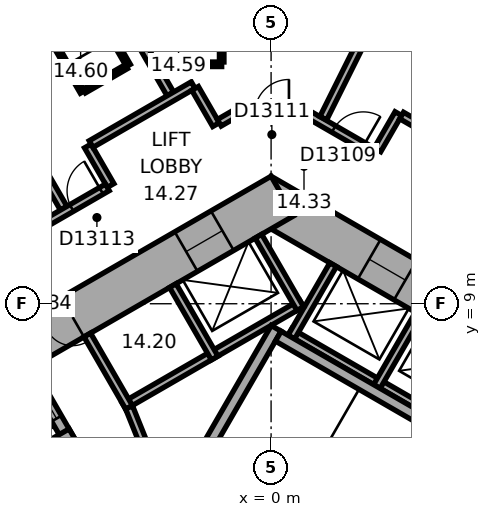
"""IFC4 building model, lengths in metres.
Left out: names, types, materials, properties, quantities, classifications, styles, units other than length and angle.
Written with IfcOpenShell. Run it as: python <this file> out.ifc"""

import sys

from ifc_helpers import new_model, si_unit, direction, frame, frame_2d, origin, place, context, subcontext, project, spatial, rectangle, extrude, element, fill, save


model = new_model("IFC4")
c1 = context("Model", 3, precision=1e-05, world=origin(), true_north=direction((0.0, 1.0)))
c2 = subcontext(c1, "Body", "Model", "MODEL_VIEW")
j1 = project(units=[si_unit("LENGTHUNIT", "METRE"), si_unit("PLANEANGLEUNIT", "RADIAN")], contexts=[c1])
p1 = place(None, origin())
s1 = spatial("IfcSite", under=j1, at=p1, CompositionType="ELEMENT")
p2 = place(p1, origin())
s2 = spatial("IfcBuilding", under=s1, at=p2, CompositionType="ELEMENT")
p3 = place(p2, frame((0.0, 0.0, 67.1)))
s3 = spatial("IfcBuildingStorey", under=s2, at=p3, CompositionType="ELEMENT", Elevation=67.1)
p4 = place(p3, frame((10.4, 5.658, 0.0), z_axis=(0.0, 0.0, 1.0), x_axis=(-0.866021384402, 0.500006961711, 0.0)))
e1 = element("IfcWall", 1, at=p4, inside=s3, PredefinedType="SHEAR", context=c2, shape_type="SweptSolid", body=[
    extrude(rectangle(XDim=12.355, YDim=1.2, at=frame_2d((6.178, 0.0))), origin(), (0.0, 0.0, 1.0), 3.3),
])
p5 = place(p4, frame((2.728, 0.0, 0.0)))
e2 = element("IfcOpeningElement", 2, at=p5, cuts=e1, PredefinedType="OPENING", context=c2, shape_type="SweptSolid", body=[
    extrude(rectangle(XDim=1.1, YDim=2.1, at=frame_2d((0.55, 1.05))), frame((0.0, 0.61, 0.0), z_axis=(0.0, -1.0, 0.0), x_axis=(1.0, 0.0, 0.0)), (0.0, 0.0, 1.0), 1.22),
])
p6 = place(p4, frame((5.328, 0.0, 0.0)))
e3 = element("IfcOpeningElement", 3, at=p6, cuts=e1, PredefinedType="OPENING", context=c2, shape_type="SweptSolid", body=[
    extrude(rectangle(XDim=1.1, YDim=2.1, at=frame_2d((0.55, 1.05))), frame((0.0, 0.61, 0.0), z_axis=(0.0, -1.0, 0.0), x_axis=(1.0, 0.0, 0.0)), (0.0, 0.0, 1.0), 1.22),
])
p7 = place(p4, frame((7.928, 0.0, 0.0)))
e4 = element("IfcOpeningElement", 4, at=p7, cuts=e1, PredefinedType="OPENING", context=c2, shape_type="SweptSolid", body=[
    extrude(rectangle(XDim=1.1, YDim=2.1, at=frame_2d((0.55, 1.05))), frame((0.0, 0.61, 0.0), z_axis=(0.0, -1.0, 0.0), x_axis=(1.0, 0.0, 0.0)), (0.0, 0.0, 1.0), 1.22),
])
p8 = place(p3, frame((0.3, 11.836, 0.0), z_axis=(0.0, 0.0, 1.0), x_axis=(-0.866021384402, -0.500006961711, 0.0)))
e5 = element("IfcWall", 5, at=p8, inside=s3, PredefinedType="SHEAR", context=c2, shape_type="SweptSolid", body=[
    extrude(rectangle(XDim=12.355, YDim=1.2, at=frame_2d((6.178, 0.0))), origin(), (0.0, 0.0, 1.0), 3.3),
])
p9 = place(p8, frame((6.378, 0.0, 0.0)))
e6 = element("IfcOpeningElement", 6, at=p9, cuts=e5, PredefinedType="OPENING", context=c2, shape_type="SweptSolid", body=[
    extrude(rectangle(XDim=1.5, YDim=2.1, at=frame_2d((0.75, 1.05))), frame((0.0, 0.61, 0.0), z_axis=(0.0, -1.0, 0.0), x_axis=(1.0, 0.0, 0.0)), (0.0, 0.0, 1.0), 1.22),
])
p10 = place(p8, frame((1.828, 0.0, 0.0)))
e7 = element("IfcOpeningElement", 7, at=p10, cuts=e5, PredefinedType="OPENING", context=c2, shape_type="SweptSolid", body=[
    extrude(rectangle(XDim=1.1, YDim=2.1, at=frame_2d((0.55, 1.05))), frame((0.0, 0.61, 0.0), z_axis=(0.0, -1.0, 0.0), x_axis=(1.0, 0.0, 0.0)), (0.0, 0.0, 1.0), 1.22),
])
p11 = place(p3, frame((20.63, 15.47, 0.0), z_axis=(0.0, 0.0, 1.0), x_axis=(-0.894934518609, 0.446197498203, 0.0)))
e8 = element("IfcWall", 8, at=p11, inside=s3, PredefinedType="STANDARD", context=c2, shape_type="SweptSolid", body=[
    extrude(rectangle(XDim=21.246, YDim=0.2, at=frame_2d((10.623, 0.0))), origin(), (0.0, 0.0, 1.0), 3.3),
])
p12 = place(p11, frame((1.553, 0.0, 0.8)))
e9 = element("IfcOpeningElement", 9, at=p12, cuts=e8, PredefinedType="OPENING", context=c2, shape_type="SweptSolid", body=[
    extrude(rectangle(XDim=2.4, YDim=1.7, at=frame_2d((1.2, 0.85))), frame((0.0, 0.11, 0.0), z_axis=(0.0, -1.0, 0.0), x_axis=(1.0, 0.0, 0.0)), (0.0, 0.0, 1.0), 0.22),
])
p13 = place(p11, frame((5.488, 0.0, 0.8)))
e10 = element("IfcOpeningElement", 10, at=p13, cuts=e8, PredefinedType="OPENING", context=c2, shape_type="SweptSolid", body=[
    extrude(rectangle(XDim=2.4, YDim=1.7, at=frame_2d((1.2, 0.85))), frame((0.0, 0.11, 0.0), z_axis=(0.0, -1.0, 0.0), x_axis=(1.0, 0.0, 0.0)), (0.0, 0.0, 1.0), 0.22),
])
p14 = place(p11, frame((9.422, 0.0, 0.8)))
e11 = element("IfcOpeningElement", 11, at=p14, cuts=e8, PredefinedType="OPENING", context=c2, shape_type="SweptSolid", body=[
    extrude(rectangle(XDim=2.4, YDim=1.7, at=frame_2d((1.2, 0.85))), frame((0.0, 0.11, 0.0), z_axis=(0.0, -1.0, 0.0), x_axis=(1.0, 0.0, 0.0)), (0.0, 0.0, 1.0), 0.22),
])
p15 = place(p11, frame((13.357, 0.0, 0.8)))
e12 = element("IfcOpeningElement", 12, at=p15, cuts=e8, PredefinedType="OPENING", context=c2, shape_type="SweptSolid", body=[
    extrude(rectangle(XDim=2.4, YDim=1.7, at=frame_2d((1.2, 0.85))), frame((0.0, 0.11, 0.0), z_axis=(0.0, -1.0, 0.0), x_axis=(1.0, 0.0, 0.0)), (0.0, 0.0, 1.0), 0.22),
])
p16 = place(p11, frame((17.292, 0.0, 0.8)))
e13 = element("IfcOpeningElement", 13, at=p16, cuts=e8, PredefinedType="OPENING", context=c2, shape_type="SweptSolid", body=[
    extrude(rectangle(XDim=2.4, YDim=1.7, at=frame_2d((1.2, 0.85))), frame((0.0, 0.11, 0.0), z_axis=(0.0, -1.0, 0.0), x_axis=(1.0, 0.0, 0.0)), (0.0, 0.0, 1.0), 0.22),
])
p17 = place(p3, frame((-3.136, 24.805, 0.0), z_axis=(0.0, 0.0, 1.0), x_axis=(-0.866028291626, -0.499994998079, 0.0)))
e14 = element("IfcWall", 14, at=p17, inside=s3, PredefinedType="STANDARD", context=c2, shape_type="SweptSolid", body=[
    extrude(rectangle(XDim=21.246, YDim=0.2, at=frame_2d((10.623, 0.0))), origin(), (0.0, 0.0, 1.0), 3.3),
])
p18 = place(p17, frame((1.555, 0.0, 0.8)))
e15 = element("IfcOpeningElement", 15, at=p18, cuts=e14, PredefinedType="OPENING", context=c2, shape_type="SweptSolid", body=[
    extrude(rectangle(XDim=2.4, YDim=1.7, at=frame_2d((1.2, 0.85))), frame((0.0, 0.11, 0.0), z_axis=(0.0, -1.0, 0.0), x_axis=(1.0, 0.0, 0.0)), (0.0, 0.0, 1.0), 0.22),
])
p19 = place(p17, frame((5.489, 0.0, 0.8)))
e16 = element("IfcOpeningElement", 16, at=p19, cuts=e14, PredefinedType="OPENING", context=c2, shape_type="SweptSolid", body=[
    extrude(rectangle(XDim=2.4, YDim=1.7, at=frame_2d((1.2, 0.85))), frame((0.0, 0.11, 0.0), z_axis=(0.0, -1.0, 0.0), x_axis=(1.0, 0.0, 0.0)), (0.0, 0.0, 1.0), 0.22),
])
p20 = place(p17, frame((9.424, 0.0, 0.8)))
e17 = element("IfcOpeningElement", 17, at=p20, cuts=e14, PredefinedType="OPENING", context=c2, shape_type="SweptSolid", body=[
    extrude(rectangle(XDim=2.4, YDim=1.7, at=frame_2d((1.2, 0.85))), frame((0.0, 0.11, 0.0), z_axis=(0.0, -1.0, 0.0), x_axis=(1.0, 0.0, 0.0)), (0.0, 0.0, 1.0), 0.22),
])
p21 = place(p17, frame((13.358, 0.0, 0.8)))
e18 = element("IfcOpeningElement", 18, at=p21, cuts=e14, PredefinedType="OPENING", context=c2, shape_type="SweptSolid", body=[
    extrude(rectangle(XDim=2.4, YDim=1.7, at=frame_2d((1.2, 0.85))), frame((0.0, 0.11, 0.0), z_axis=(0.0, -1.0, 0.0), x_axis=(1.0, 0.0, 0.0)), (0.0, 0.0, 1.0), 0.22),
])
p22 = place(p17, frame((17.293, 0.0, 0.8)))
e19 = element("IfcOpeningElement", 19, at=p22, cuts=e14, PredefinedType="OPENING", context=c2, shape_type="SweptSolid", body=[
    extrude(rectangle(XDim=2.4, YDim=1.7, at=frame_2d((1.2, 0.85))), frame((0.0, 0.11, 0.0), z_axis=(0.0, -1.0, 0.0), x_axis=(1.0, 0.0, 0.0)), (0.0, 0.0, 1.0), 0.22),
])
p23 = place(p3, frame((7.424, 4.259, 0.0), z_axis=(0.0, 0.0, 1.0), x_axis=(-0.866026010844, 0.49999894854, 0.0)))
e20 = element("IfcWall", 20, at=p23, inside=s3, PredefinedType="PARTITIONING", context=c2, shape_type="SweptSolid", body=[
    extrude(rectangle(XDim=8.0, YDim=0.2, at=frame_2d((4.0, 0.0))), origin(), (0.0, 0.0, 1.0), 3.05),
])
for number, where, z_axis, x_axis in (
    (21, (2.784, 6.822, 0.0), (0.0, 0.0, 1.0), (0.5, 0.866, 0.0)),
    (22, (0.532, 8.122, 0.0), (0.0, 0.0, 1.0), (0.5, 0.866, 0.0)),
):
    element("IfcWall", number, at=place(p3, frame(where, z_axis=z_axis, x_axis=x_axis)), inside=s3, PredefinedType="PARTITIONING", context=c2, shape_type="SweptSolid", body=[
        extrude(rectangle(XDim=2.2, YDim=0.2, at=frame_2d((1.1, 0.0))), origin(), (0.0, 0.0, 1.0), 3.05),
    ])
p24 = place(p3, frame((0.803, 9.009, 0.0), z_axis=(0.0, 0.0, 1.0), x_axis=(-0.866028230842, -0.499995103361, 0.0)))
e23 = element("IfcWall", 23, at=p24, inside=s3, PredefinedType="PARTITIONING", context=c2, shape_type="SweptSolid", body=[
    extrude(rectangle(XDim=5.4, YDim=0.2, at=frame_2d((2.7, 0.0))), origin(), (0.0, 0.0, 1.0), 3.05),
])
p25 = place(p3, frame((0.767, 8.872, 0.0), z_axis=(0.0, 0.0, 1.0), x_axis=(-0.499994660107, 0.866028486751, 0.0)))
e24 = element("IfcWall", 24, at=p25, inside=s3, PredefinedType="PARTITIONING", context=c2, shape_type="SweptSolid", body=[
    extrude(rectangle(XDim=2.2, YDim=0.2, at=frame_2d((1.1, 0.0))), origin(), (0.0, 0.0, 1.0), 3.05),
])
for number, where, z_axis, x_axis in (
    (25, (-1.485, 7.572, 0.0), (0.0, 0.0, 1.0), (-0.5, 0.866, 0.0)),
    (26, (-3.737, 6.272, 0.0), (0.0, 0.0, 1.0), (-0.5, 0.866, 0.0)),
):
    element("IfcWall", number, at=place(p3, frame(where, z_axis=z_axis, x_axis=x_axis)), inside=s3, PredefinedType="PARTITIONING", context=c2, shape_type="SweptSolid", body=[
        extrude(rectangle(XDim=2.2, YDim=0.2, at=frame_2d((1.1, 0.0))), origin(), (0.0, 0.0, 1.0), 3.05),
    ])
p26 = place(p3, frame((-2.216, 4.282, 0.0), z_axis=(0.0, 0.0, 1.0), x_axis=(0.499977259774, 0.866038532462, 0.0)))
e27 = element("IfcWall", 27, at=p26, inside=s3, PredefinedType="SHEAR", context=c2, shape_type="SweptSolid", body=[
    extrude(rectangle(XDim=4.7, YDim=0.3, at=frame_2d((2.35, 0.0))), origin(), (0.0, 0.0, 1.0), 3.05),
])
p27 = place(p3, frame((6.303, 4.617, 0.0), z_axis=(0.0, 0.0, 1.0), x_axis=(-0.866027801685, 0.499995846692, 0.0)))
e28 = element("IfcWall", 28, at=p27, inside=s3, PredefinedType="SHEAR", context=c2, shape_type="SweptSolid", body=[
    extrude(rectangle(XDim=7.06, YDim=0.3, at=frame_2d((3.53, 0.0))), origin(), (0.0, 0.0, 1.0), 3.05),
])
p28 = place(p3, frame((-5.295, 5.372, 0.0), z_axis=(0.0, 0.0, 1.0), x_axis=(-0.500077893725, 0.86598042715, 0.0)))
e29 = element("IfcWall", 29, at=p28, inside=s3, PredefinedType="SHEAR", context=c2, shape_type="SweptSolid", body=[
    extrude(rectangle(XDim=2.2, YDim=0.3, at=frame_2d((1.1, 0.0))), origin(), (0.0, 0.0, 1.0), 3.05),
])
p29 = place(p28, frame((0.7, 0.0, 0.0)))
e30 = element("IfcOpeningElement", 30, at=p29, cuts=e29, PredefinedType="OPENING", context=c2, shape_type="SweptSolid", body=[
    extrude(rectangle(XDim=1.1, YDim=2.1, at=frame_2d((0.55, 1.05))), frame((0.0, 0.16, 0.0), z_axis=(0.0, -1.0, 0.0), x_axis=(1.0, 0.0, 0.0)), (0.0, 0.0, 1.0), 0.32),
])
p30 = place(p3, frame((-5.24, 5.577, 0.0), z_axis=(0.0, 0.0, 1.0), x_axis=(-0.866014461049, -0.500018952895, 0.0)))
e31 = element("IfcWall", 31, at=p30, inside=s3, PredefinedType="SHEAR", context=c2, shape_type="SweptSolid", body=[
    extrude(rectangle(XDim=3.35, YDim=0.3, at=frame_2d((1.675, 0.0))), origin(), (0.0, 0.0, 1.0), 3.05),
])
p31 = place(p3, frame((-2.615, 3.487, 0.0), z_axis=(0.0, 0.0, 1.0), x_axis=(-0.373576831041, 0.92759924068, 0.0)))
e32 = element("IfcWall", 32, at=p31, inside=s3, PredefinedType="PARTITIONING", context=c2, shape_type="SweptSolid", body=[
    extrude(rectangle(XDim=3.002, YDim=0.2, at=frame_2d((1.501, 0.0))), origin(), (0.0, 0.0, 1.0), 3.05),
])
p32 = place(p31, frame((1.15, 0.0, 0.0)))
e33 = element("IfcOpeningElement", 33, at=p32, cuts=e32, PredefinedType="OPENING", context=c2, shape_type="SweptSolid", body=[
    extrude(rectangle(XDim=0.9, YDim=2.1, at=frame_2d((0.45, 1.05))), frame((0.0, 0.11, 0.0), z_axis=(0.0, -1.0, 0.0), x_axis=(1.0, 0.0, 0.0)), (0.0, 0.0, 1.0), 0.22),
])
p33 = place(p3, frame((-10.083, 19.524, 0.0), z_axis=(0.0, 0.0, 1.0), x_axis=(0.499999662836, -0.866025598446, 0.0)))
e34 = element("IfcWall", 34, at=p33, inside=s3, PredefinedType="PARTITIONING", context=c2, shape_type="SweptSolid", body=[
    extrude(rectangle(XDim=9.25, YDim=0.2, at=frame_2d((4.625, 0.0))), origin(), (0.0, 0.0, 1.0), 2.6),
])
p34 = place(p3, frame((-6.676, 21.492, 0.0), z_axis=(0.0, 0.0, 1.0), x_axis=(0.500011263043, -0.866018900966, 0.0)))
e35 = element("IfcWall", 35, at=p34, inside=s3, PredefinedType="PARTITIONING", context=c2, shape_type="SweptSolid", body=[
    extrude(rectangle(XDim=8.049, YDim=0.2, at=frame_2d((4.024, 0.0))), origin(), (0.0, 0.0, 1.0), 3.05),
])
p35 = place(p3, frame((-5.026, 17.469, 0.0), z_axis=(0.0, 0.0, 1.0), x_axis=(0.500005339912, -0.866022320763, 0.0)))
e36 = element("IfcWall", 36, at=p35, inside=s3, PredefinedType="PARTITIONING", context=c2, shape_type="SweptSolid", body=[
    extrude(rectangle(XDim=2.54, YDim=0.12, at=frame_2d((1.27, 0.0))), origin(), (0.0, 0.0, 1.0), 3.05),
])
p36 = place(p3, frame((-4.968, 14.569, 0.0), z_axis=(0.0, 0.0, 1.0), x_axis=(-0.500046963369, 0.865998287773, 0.0)))
e37 = element("IfcWall", 37, at=p36, inside=s3, PredefinedType="PARTITIONING", context=c2, shape_type="SweptSolid", body=[
    extrude(rectangle(XDim=2.54, YDim=0.12, at=frame_2d((1.27, 0.0))), origin(), (0.0, 0.0, 1.0), 3.05),
])
p37 = place(p36, frame((0.82, 0.0, 0.0)))
e38 = element("IfcOpeningElement", 38, at=p37, cuts=e37, PredefinedType="OPENING", context=c2, shape_type="SweptSolid", body=[
    extrude(rectangle(XDim=0.9, YDim=2.1, at=frame_2d((0.45, 1.05))), frame((0.0, 0.07, 0.0), z_axis=(0.0, -1.0, 0.0), x_axis=(1.0, 0.0, 0.0)), (0.0, 0.0, 1.0), 0.14),
])
p38 = place(p3, frame((-4.823, 13.152, 0.0), z_axis=(0.0, 0.0, 1.0), x_axis=(0.499986357472, -0.866033280158, 0.0)))
e39 = element("IfcWall", 39, at=p38, inside=s3, PredefinedType="PARTITIONING", context=c2, shape_type="SweptSolid", body=[
    extrude(rectangle(XDim=1.201, YDim=0.2, at=frame_2d((0.601, 0.0))), origin(), (0.0, 0.0, 1.0), 3.05),
])
p39 = place(p3, frame((-4.309, 12.061, 0.0), z_axis=(0.0, 0.0, 1.0), x_axis=(-0.866020679205, -0.500008183122, 0.0)))
e40 = element("IfcWall", 40, at=p39, inside=s3, PredefinedType="PARTITIONING", context=c2, shape_type="SweptSolid", body=[
    extrude(rectangle(XDim=5.104, YDim=0.2, at=frame_2d((2.552, 0.0))), origin(), (0.0, 0.0, 1.0), 3.05),
])
p40 = place(p39, frame((0.185, 0.0, 0.0)))
e41 = element("IfcOpeningElement", 41, at=p40, cuts=e40, PredefinedType="OPENING", context=c2, shape_type="SweptSolid", body=[
    extrude(rectangle(XDim=0.9, YDim=2.1, at=frame_2d((0.45, 1.05))), frame((0.0, 0.11, 0.0), z_axis=(0.0, -1.0, 0.0), x_axis=(1.0, 0.0, 0.0)), (0.0, 0.0, 1.0), 0.22),
])
p41 = place(p39, frame((2.736, 0.0, 0.0)))
e42 = element("IfcOpeningElement", 42, at=p41, cuts=e40, PredefinedType="OPENING", context=c2, shape_type="SweptSolid", body=[
    extrude(rectangle(XDim=0.9, YDim=2.1, at=frame_2d((0.45, 1.05))), frame((0.0, 0.11, 0.0), z_axis=(0.0, -1.0, 0.0), x_axis=(1.0, 0.0, 0.0)), (0.0, 0.0, 1.0), 0.22),
])
p42 = place(p3, frame((-3.808, 15.239, 0.0), z_axis=(0.0, 0.0, 1.0), x_axis=(-0.866087136806, -0.499893060024, 0.0)))
e43 = element("IfcWall", 43, at=p42, inside=s3, PredefinedType="PARTITIONING", context=c2, shape_type="SweptSolid", body=[
    extrude(rectangle(XDim=1.28, YDim=0.12, at=frame_2d((0.64, 0.0))), origin(), (0.0, 0.0, 1.0), 3.05),
])
p43 = place(p3, frame((-2.05, 14.752, 0.0), z_axis=(0.0, 0.0, 1.0), x_axis=(-0.866030936828, -0.499990416364, 0.0)))
e44 = element("IfcWall", 44, at=p43, inside=s3, PredefinedType="PARTITIONING", context=c2, shape_type="SweptSolid", body=[
    extrude(rectangle(XDim=3.102, YDim=0.2, at=frame_2d((1.551, 0.0))), origin(), (0.0, 0.0, 1.0), 3.05),
])
p44 = place(p3, frame((-1.449, 13.712, 0.0), z_axis=(0.0, 0.0, 1.0), x_axis=(-0.499978356969, 0.866037899034, 0.0)))
e45 = element("IfcWall", 45, at=p44, inside=s3, PredefinedType="PARTITIONING", context=c2, shape_type="SweptSolid", body=[
    extrude(rectangle(XDim=1.101, YDim=0.2, at=frame_2d((0.551, 0.0))), origin(), (0.0, 0.0, 1.0), 3.05),
])
p45 = place(p3, frame((-1.3, 15.301, 0.0), z_axis=(0.0, 0.0, 1.0), x_axis=(-1.0, 0.0, 0.0)))
e46 = element("IfcWall", 46, at=p45, inside=s3, PredefinedType="PARTITIONING", context=c2, shape_type="SweptSolid", body=[
    extrude(rectangle(XDim=1.661, YDim=0.12, at=frame_2d((0.831, 0.0))), origin(), (0.0, 0.0, 1.0), 3.05),
])
p46 = place(p3, frame((-1.3, 18.341, 0.0), z_axis=(0.0, 0.0, 1.0), x_axis=(0.0, -1.0, 0.0)))
e47 = element("IfcWall", 47, at=p46, inside=s3, PredefinedType="PARTITIONING", context=c2, shape_type="SweptSolid", body=[
    extrude(rectangle(XDim=2.98, YDim=0.12, at=frame_2d((1.49, 0.0))), origin(), (0.0, 0.0, 1.0), 3.05),
])
p47 = place(p46, frame((1.04, 0.0, 0.0)))
e48 = element("IfcOpeningElement", 48, at=p47, cuts=e47, PredefinedType="OPENING", context=c2, shape_type="SweptSolid", body=[
    extrude(rectangle(XDim=0.9, YDim=2.1, at=frame_2d((0.45, 1.05))), frame((0.0, 0.07, 0.0), z_axis=(0.0, -1.0, 0.0), x_axis=(1.0, 0.0, 0.0)), (0.0, 0.0, 1.0), 0.14),
])
p48 = place(p3, frame((-0.95, 14.001, 0.0), z_axis=(0.0, 0.0, 1.0), x_axis=(-0.86609177584, -0.499885022602, 0.0)))
e49 = element("IfcWall", 49, at=p48, inside=s3, PredefinedType="PARTITIONING", context=c2, shape_type="SweptSolid", body=[
    extrude(rectangle(XDim=0.477, YDim=0.2, at=frame_2d((0.238, 0.0))), origin(), (0.0, 0.0, 1.0), 3.05),
])
p49 = place(p3, frame((0.95, 14.001, 0.0), z_axis=(0.0, 0.0, 1.0), x_axis=(-1.0, 0.0, 0.0)))
e50 = element("IfcWall", 50, at=p49, inside=s3, PredefinedType="PARTITIONING", context=c2, shape_type="SweptSolid", body=[
    extrude(rectangle(XDim=1.86, YDim=0.2, at=frame_2d((0.93, 0.0))), origin(), (0.0, 0.0, 1.0), 3.05),
])
p50 = place(p49, frame((0.48, 0.0, 0.0)))
e51 = element("IfcOpeningElement", 51, at=p50, cuts=e50, PredefinedType="OPENING", context=c2, shape_type="SweptSolid", body=[
    extrude(rectangle(XDim=0.9, YDim=2.1, at=frame_2d((0.45, 1.05))), frame((0.0, 0.11, 0.0), z_axis=(0.0, -1.0, 0.0), x_axis=(1.0, 0.0, 0.0)), (0.0, 0.0, 1.0), 0.22),
])
p51 = place(p3, frame((2.748, 12.962, 0.0), z_axis=(0.0, 0.0, 1.0), x_axis=(-0.866013897511, 0.50001992892, 0.0)))
e52 = element("IfcWall", 52, at=p51, inside=s3, PredefinedType="PARTITIONING", context=c2, shape_type="SweptSolid", body=[
    extrude(rectangle(XDim=2.037, YDim=0.2, at=frame_2d((1.018, 0.0))), origin(), (0.0, 0.0, 1.0), 3.05),
])
p52 = place(p51, frame((0.372, 0.0, 0.0)))
e53 = element("IfcOpeningElement", 53, at=p52, cuts=e52, PredefinedType="OPENING", context=c2, shape_type="SweptSolid", body=[
    extrude(rectangle(XDim=0.9, YDim=2.1, at=frame_2d((0.45, 1.05))), frame((0.0, 0.11, 0.0), z_axis=(0.0, -1.0, 0.0), x_axis=(1.0, 0.0, 0.0)), (0.0, 0.0, 1.0), 0.22),
])
p53 = place(p3, frame((3.349, 14.002, 0.0), z_axis=(0.0, 0.0, 1.0), x_axis=(-0.500074377092, -0.865982457891, 0.0)))
e54 = element("IfcWall", 54, at=p53, inside=s3, PredefinedType="PARTITIONING", context=c2, shape_type="SweptSolid", body=[
    extrude(rectangle(XDim=1.101, YDim=0.2, at=frame_2d((0.55, 0.0))), origin(), (0.0, 0.0, 1.0), 3.05),
])
p54 = place(p3, frame((5.351, 21.859, 0.0), z_axis=(0.0, 0.0, 1.0), x_axis=(-0.446205309328, -0.894930624086, 0.0)))
e55 = element("IfcWall", 55, at=p54, inside=s3, PredefinedType="PARTITIONING", context=c2, shape_type="SweptSolid", body=[
    extrude(rectangle(XDim=8.913, YDim=0.2, at=frame_2d((4.457, 0.0))), origin(), (0.0, 0.0, 1.0), 2.6),
])
p55 = place(p3, frame((10.885, 9.652, 0.0), z_axis=(0.0, 0.0, 1.0), x_axis=(-0.866033868542, 0.499985338323, 0.0)))
e56 = element("IfcWall", 56, at=p55, inside=s3, PredefinedType="PARTITIONING", context=c2, shape_type="SweptSolid", body=[
    extrude(rectangle(XDim=8.602, YDim=0.2, at=frame_2d((4.301, 0.0))), origin(), (0.0, 0.0, 1.0), 3.05),
])
p56 = place(p55, frame((5.302, 0.0, 0.0)))
e57 = element("IfcOpeningElement", 57, at=p56, cuts=e56, PredefinedType="OPENING", context=c2, shape_type="SweptSolid", body=[
    extrude(rectangle(XDim=0.9, YDim=2.1, at=frame_2d((0.45, 1.05))), frame((0.0, 0.11, 0.0), z_axis=(0.0, -1.0, 0.0), x_axis=(1.0, 0.0, 0.0)), (0.0, 0.0, 1.0), 0.22),
])
p57 = place(p9, origin())
e58 = element("IfcDoor", 58, at=p57, inside=s3, OperationType="DOUBLE_DOOR_SINGLE_SWING", PredefinedType="DOOR", context=c2, shape_type="SweptSolid", body=[
    extrude(rectangle(XDim=1.5, YDim=2.1, at=frame_2d((0.75, 1.05))), frame((0.0, 0.025, 0.0), z_axis=(0.0, -1.0, 0.0), x_axis=(1.0, 0.0, 0.0)), (0.0, 0.0, 1.0), 0.05),
])
fill(e6, e58)
p58 = place(p29, origin())
e59 = element("IfcDoor", 59, at=p58, inside=s3, OperationType="DOUBLE_DOOR_SLIDING", PredefinedType="DOOR", context=c2, shape_type="SweptSolid", body=[
    extrude(rectangle(XDim=1.1, YDim=2.1, at=frame_2d((0.55, 1.05))), frame((0.0, 0.025, 0.0), z_axis=(0.0, -1.0, 0.0), x_axis=(1.0, 0.0, 0.0)), (0.0, 0.0, 1.0), 0.05),
])
fill(e30, e59)
p59 = place(p7, origin())
e60 = element("IfcDoor", 60, at=p59, inside=s3, OperationType="DOUBLE_DOOR_SLIDING", PredefinedType="DOOR", context=c2, shape_type="SweptSolid", body=[
    extrude(rectangle(XDim=1.1, YDim=2.1, at=frame_2d((0.55, 1.05))), frame((0.0, 0.025, 0.0), z_axis=(0.0, -1.0, 0.0), x_axis=(1.0, 0.0, 0.0)), (0.0, 0.0, 1.0), 0.05),
])
fill(e4, e60)
p60 = place(p10, origin())
e61 = element("IfcDoor", 61, at=p60, inside=s3, OperationType="DOUBLE_DOOR_SLIDING", PredefinedType="DOOR", context=c2, shape_type="SweptSolid", body=[
    extrude(rectangle(XDim=1.1, YDim=2.1, at=frame_2d((0.55, 1.05))), frame((0.0, 0.025, 0.0), z_axis=(0.0, -1.0, 0.0), x_axis=(1.0, 0.0, 0.0)), (0.0, 0.0, 1.0), 0.05),
])
fill(e7, e61)
p61 = place(p52, origin())
e62 = element("IfcDoor", 62, at=p61, inside=s3, OperationType="SINGLE_SWING_LEFT", PredefinedType="DOOR", context=c2, shape_type="SweptSolid", body=[
    extrude(rectangle(XDim=0.9, YDim=2.1, at=frame_2d((0.45, 1.05))), frame((0.0, 0.025, 0.0), z_axis=(0.0, -1.0, 0.0), x_axis=(1.0, 0.0, 0.0)), (0.0, 0.0, 1.0), 0.05),
])
fill(e53, e62)
p62 = place(p50, origin())
e63 = element("IfcDoor", 63, at=p62, inside=s3, OperationType="SINGLE_SWING_LEFT", PredefinedType="DOOR", context=c2, shape_type="SweptSolid", body=[
    extrude(rectangle(XDim=0.9, YDim=2.1, at=frame_2d((0.45, 1.05))), frame((0.0, 0.025, 0.0), z_axis=(0.0, -1.0, 0.0), x_axis=(1.0, 0.0, 0.0)), (0.0, 0.0, 1.0), 0.05),
])
fill(e51, e63)
p63 = place(p40, origin())
e64 = element("IfcDoor", 64, at=p63, inside=s3, OperationType="SINGLE_SWING_LEFT", PredefinedType="DOOR", context=c2, shape_type="SweptSolid", body=[
    extrude(rectangle(XDim=0.9, YDim=2.1, at=frame_2d((0.45, 1.05))), frame((0.0, 0.025, 0.0), z_axis=(0.0, -1.0, 0.0), x_axis=(1.0, 0.0, 0.0)), (0.0, 0.0, 1.0), 0.05),
])
fill(e41, e64)
p64 = place(p37, origin())
e65 = element("IfcDoor", 65, at=p64, inside=s3, OperationType="SINGLE_SWING_LEFT", PredefinedType="DOOR", context=c2, shape_type="SweptSolid", body=[
    extrude(rectangle(XDim=0.9, YDim=2.1, at=frame_2d((0.45, 1.05))), frame((0.0, 0.025, 0.0), z_axis=(0.0, -1.0, 0.0), x_axis=(1.0, 0.0, 0.0)), (0.0, 0.0, 1.0), 0.05),
])
fill(e38, e65)
save(model, sys.argv[1])
